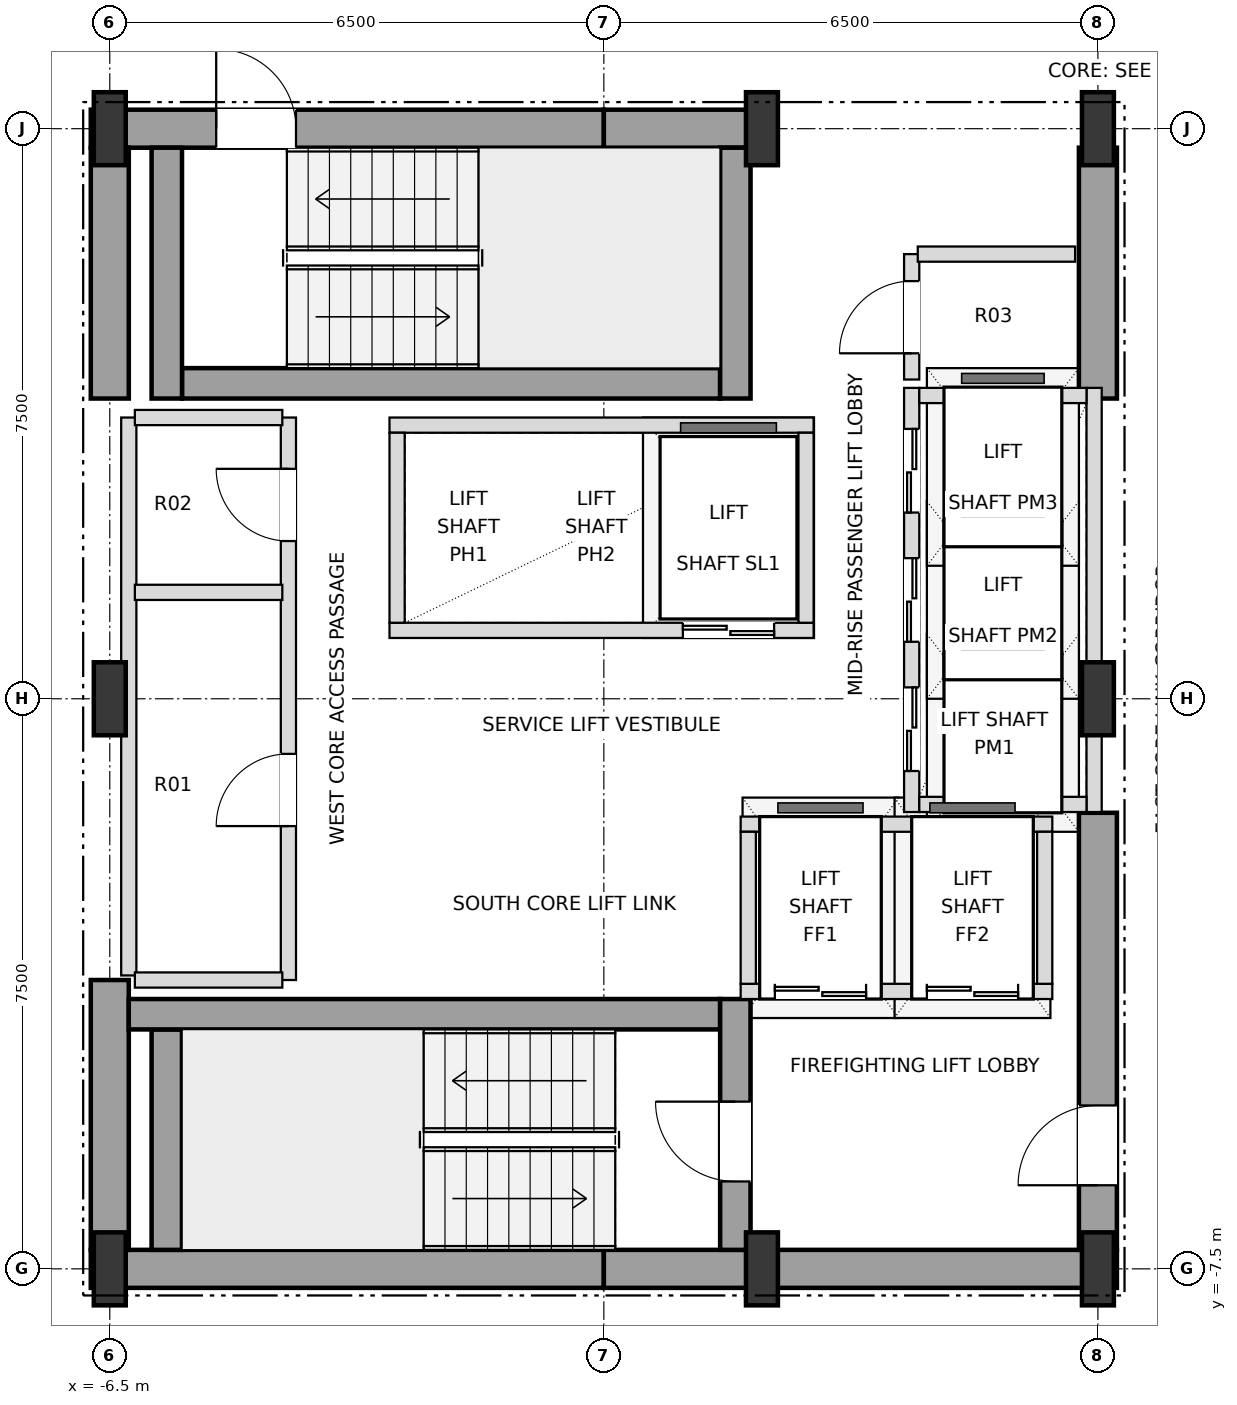
"""IFC4 building model, lengths in metres.
Left out: names, types, materials, properties, quantities, classifications, styles, units other than length and angle.
Written with IfcOpenShell. Run it as: python <this file> out.ifc"""

import sys

from ifc_helpers import new_model, si_unit, direction, frame, frame_2d, origin, origin_2d, place, context, subcontext, project, spatial, rectangle, i_section, extrude, element, fill, save


model = new_model("IFC4")
c1 = context("Model", 3, precision=1e-05, world=origin(), true_north=direction((0.0, 1.0)))
c2 = subcontext(c1, "Body", "Model", "MODEL_VIEW")
j1 = project(units=[si_unit("LENGTHUNIT", "METRE"), si_unit("PLANEANGLEUNIT", "RADIAN")], contexts=[c1])
p1 = place(None, origin())
s1 = spatial("IfcSite", under=j1, at=p1, CompositionType="ELEMENT")
p2 = place(p1, origin())
s2 = spatial("IfcBuilding", under=s1, at=p2, CompositionType="ELEMENT")
p3 = place(p2, frame((0.0, 0.0, 129.6)))
s3 = spatial("IfcBuildingStorey", under=s2, at=p3, CompositionType="ELEMENT", Elevation=129.6)
for number, where, z_axis, x_axis in (
    (1, (-6.5, -7.5, 0.0), (0.0, 0.0, 1.0), (1.0, 0.0, 0.0)),
    (2, (2.08, -7.5, 0.0), (0.0, 0.0, 1.0), (1.0, 0.0, 0.0)),
    (3, (6.5, -7.5, 0.0), (0.0, 0.0, 1.0), (1.0, 0.0, 0.0)),
    (4, (-6.5, 0.0, 0.0), (0.0, 0.0, 1.0), (1.0, 0.0, 0.0)),
    (5, (6.5, 0.0, 0.0), (0.0, 0.0, 1.0), (1.0, 0.0, 0.0)),
    (6, (-6.5, 7.5, 0.0), (0.0, 0.0, 1.0), (1.0, 0.0, 0.0)),
    (7, (2.08, 7.5, 0.0), (0.0, 0.0, 1.0), (1.0, 0.0, 0.0)),
    (8, (6.5, 7.5, 0.0), (0.0, 0.0, 1.0), (1.0, 0.0, 0.0)),
):
    element("IfcColumn", number, at=place(p3, frame(where, z_axis=z_axis, x_axis=x_axis)), inside=s3, PredefinedType="COLUMN", context=c2, shape_type="SweptSolid", body=[
        extrude(i_section(OverallWidth=0.42, OverallDepth=0.96, WebThickness=0.022, FlangeThickness=0.034, at=origin_2d()), origin(), (0.0, 0.0, 1.0), 3.6),
    ])
for number, where, z_axis, x_axis in (
    (9, (-6.75, -7.5, 0.0), (0.0, 0.0, 1.0), (1.0, 0.0, 0.0)),
    (10, (0.0, -7.5, 0.0), (0.0, 0.0, 1.0), (1.0, 0.0, 0.0)),
):
    element("IfcWall", number, at=place(p3, frame(where, z_axis=z_axis, x_axis=x_axis)), inside=s3, PredefinedType="SHEAR", context=c2, shape_type="SweptSolid", body=[
        extrude(rectangle(XDim=6.75, YDim=0.5, at=frame_2d((3.375, 0.0))), origin(), (0.0, 0.0, 1.0), 3.38),
    ])
p4 = place(p3, frame((-6.75, 7.5, 0.0), z_axis=(0.0, 0.0, 1.0), x_axis=(1.0, 0.0, 0.0)))
e11 = element("IfcWall", 11, at=p4, inside=s3, PredefinedType="SHEAR", context=c2, shape_type="SweptSolid", body=[
    extrude(rectangle(XDim=6.75, YDim=0.5, at=frame_2d((3.375, 0.0))), origin(), (0.0, 0.0, 1.0), 3.38),
])
p5 = place(p4, frame((1.65, 0.0, 0.0)))
e12 = element("IfcOpeningElement", 12, at=p5, cuts=e11, PredefinedType="OPENING", context=c2, shape_type="SweptSolid", body=[
    extrude(rectangle(XDim=1.05, YDim=2.15, at=frame_2d((0.525, 1.075))), frame((0.0, 0.26, 0.0), z_axis=(0.0, -1.0, 0.0), x_axis=(1.0, 0.0, 0.0)), (0.0, 0.0, 1.0), 0.52),
])
p6 = place(p3, frame((0.0, 7.5, 0.0), z_axis=(0.0, 0.0, 1.0), x_axis=(1.0, 0.0, 0.0)))
e13 = element("IfcWall", 13, at=p6, inside=s3, PredefinedType="SHEAR", context=c2, shape_type="SweptSolid", body=[
    extrude(rectangle(XDim=2.08, YDim=0.5, at=frame_2d((1.04, 0.0))), origin(), (0.0, 0.0, 1.0), 3.38),
])
p7 = place(p3, frame((-6.5, -7.25, 0.0), z_axis=(0.0, 0.0, 1.0), x_axis=(0.0, 1.0, 0.0)))
e14 = element("IfcWall", 14, at=p7, inside=s3, PredefinedType="SHEAR", context=c2, shape_type="SweptSolid", body=[
    extrude(rectangle(XDim=3.55, YDim=0.5, at=frame_2d((1.775, 0.0))), origin(), (0.0, 0.0, 1.0), 3.38),
])
p8 = place(p3, frame((-6.5, 3.95, 0.0), z_axis=(0.0, 0.0, 1.0), x_axis=(0.0, 1.0, 0.0)))
e15 = element("IfcWall", 15, at=p8, inside=s3, PredefinedType="SHEAR", context=c2, shape_type="SweptSolid", body=[
    extrude(rectangle(XDim=3.3, YDim=0.5, at=frame_2d((1.65, 0.0))), origin(), (0.0, 0.0, 1.0), 3.38),
])
p9 = place(p3, frame((6.5, -7.25, 0.0), z_axis=(0.0, 0.0, 1.0), x_axis=(0.0, 1.0, 0.0)))
e16 = element("IfcWall", 16, at=p9, inside=s3, PredefinedType="SHEAR", context=c2, shape_type="SweptSolid", body=[
    extrude(rectangle(XDim=5.75, YDim=0.5, at=frame_2d((2.875, 0.0))), origin(), (0.0, 0.0, 1.0), 3.38),
])
p10 = place(p9, frame((0.85, 0.0, 0.0)))
e17 = element("IfcOpeningElement", 17, at=p10, cuts=e16, PredefinedType="OPENING", context=c2, shape_type="SweptSolid", body=[
    extrude(rectangle(XDim=1.05, YDim=2.15, at=frame_2d((0.525, 1.075))), frame((0.0, 0.26, 0.0), z_axis=(0.0, -1.0, 0.0), x_axis=(1.0, 0.0, 0.0)), (0.0, 0.0, 1.0), 0.52),
])
p11 = place(p3, frame((6.5, 3.95, 0.0), z_axis=(0.0, 0.0, 1.0), x_axis=(0.0, 1.0, 0.0)))
e18 = element("IfcWall", 18, at=p11, inside=s3, PredefinedType="SHEAR", context=c2, shape_type="SweptSolid", body=[
    extrude(rectangle(XDim=3.3, YDim=0.5, at=frame_2d((1.65, 0.0))), origin(), (0.0, 0.0, 1.0), 3.38),
])
p12 = place(p3, frame((-5.75, -7.25, 0.0), z_axis=(0.0, 0.0, 1.0), x_axis=(0.0, 1.0, 0.0)))
e19 = element("IfcWall", 19, at=p12, inside=s3, PredefinedType="SHEAR", context=c2, shape_type="SweptSolid", body=[
    extrude(rectangle(XDim=2.9, YDim=0.4, at=frame_2d((1.45, 0.0))), origin(), (0.0, 0.0, 1.0), 3.38),
])
p13 = place(p3, frame((-6.25, -4.15, 0.0), z_axis=(0.0, 0.0, 1.0), x_axis=(1.0, 0.0, 0.0)))
e20 = element("IfcWall", 20, at=p13, inside=s3, PredefinedType="SHEAR", context=c2, shape_type="SweptSolid", body=[
    extrude(rectangle(XDim=7.78, YDim=0.4, at=frame_2d((3.89, 0.0))), origin(), (0.0, 0.0, 1.0), 3.38),
])
p14 = place(p3, frame((1.73, -7.25, 0.0), z_axis=(0.0, 0.0, 1.0), x_axis=(0.0, 1.0, 0.0)))
e21 = element("IfcWall", 21, at=p14, inside=s3, PredefinedType="SHEAR", context=c2, shape_type="SweptSolid", body=[
    extrude(rectangle(XDim=3.3, YDim=0.4, at=frame_2d((1.65, 0.0))), origin(), (0.0, 0.0, 1.0), 3.38),
])
p15 = place(p14, frame((0.9, 0.0, 0.0)))
e22 = element("IfcOpeningElement", 22, at=p15, cuts=e21, PredefinedType="OPENING", context=c2, shape_type="SweptSolid", body=[
    extrude(rectangle(XDim=1.05, YDim=2.15, at=frame_2d((0.525, 1.075))), frame((0.0, 0.21, 0.0), z_axis=(0.0, -1.0, 0.0), x_axis=(1.0, 0.0, 0.0)), (0.0, 0.0, 1.0), 0.42),
])
p16 = place(p3, frame((-5.55, 4.15, 0.0), z_axis=(0.0, 0.0, 1.0), x_axis=(1.0, 0.0, 0.0)))
e23 = element("IfcWall", 23, at=p16, inside=s3, PredefinedType="SHEAR", context=c2, shape_type="SweptSolid", body=[
    extrude(rectangle(XDim=7.08, YDim=0.4, at=frame_2d((3.54, 0.0))), origin(), (0.0, 0.0, 1.0), 3.38),
])
for number, where, z_axis, x_axis in (
    (24, (1.73, 3.95, 0.0), (0.0, 0.0, 1.0), (0.0, 1.0, 0.0)),
    (25, (-5.75, 3.95, 0.0), (0.0, 0.0, 1.0), (0.0, 1.0, 0.0)),
):
    element("IfcWall", number, at=place(p3, frame(where, z_axis=z_axis, x_axis=x_axis)), inside=s3, PredefinedType="SHEAR", context=c2, shape_type="SweptSolid", body=[
        extrude(rectangle(XDim=3.3, YDim=0.4, at=frame_2d((1.65, 0.0))), origin(), (0.0, 0.0, 1.0), 3.38),
    ])
p17 = place(p3, frame((4.05, -1.49, 0.0), z_axis=(0.0, 0.0, 1.0), x_axis=(0.0, 1.0, 0.0)))
e26 = element("IfcWall", 26, at=p17, inside=s3, PredefinedType="SOLIDWALL", context=c2, shape_type="SweptSolid", body=[
    extrude(rectangle(XDim=5.58, YDim=0.2, at=frame_2d((2.79, 0.0))), origin(), (0.0, 0.0, 1.0), 3.38),
])
p18 = place(p17, frame((0.54, 0.0, 0.0)))
e27 = element("IfcOpeningElement", 27, at=p18, cuts=e26, PredefinedType="OPENING", context=c2, shape_type="SweptSolid", body=[
    extrude(rectangle(XDim=1.1, YDim=2.15, at=frame_2d((0.55, 1.075))), frame((0.0, 0.11, 0.0), z_axis=(0.0, -1.0, 0.0), x_axis=(1.0, 0.0, 0.0)), (0.0, 0.0, 1.0), 0.22),
])
p19 = place(p17, frame((2.24, 0.0, 0.0)))
e28 = element("IfcOpeningElement", 28, at=p19, cuts=e26, PredefinedType="OPENING", context=c2, shape_type="SweptSolid", body=[
    extrude(rectangle(XDim=1.1, YDim=2.15, at=frame_2d((0.55, 1.075))), frame((0.0, 0.11, 0.0), z_axis=(0.0, -1.0, 0.0), x_axis=(1.0, 0.0, 0.0)), (0.0, 0.0, 1.0), 0.22),
])
p20 = place(p17, frame((3.94, 0.0, 0.0)))
e29 = element("IfcOpeningElement", 29, at=p20, cuts=e26, PredefinedType="OPENING", context=c2, shape_type="SweptSolid", body=[
    extrude(rectangle(XDim=1.1, YDim=2.15, at=frame_2d((0.55, 1.075))), frame((0.0, 0.11, 0.0), z_axis=(0.0, -1.0, 0.0), x_axis=(1.0, 0.0, 0.0)), (0.0, 0.0, 1.0), 0.22),
])
p21 = place(p3, frame((6.45, -1.49, 0.0), z_axis=(0.0, 0.0, 1.0), x_axis=(0.0, 1.0, 0.0)))
e30 = element("IfcWall", 30, at=p21, inside=s3, PredefinedType="SOLIDWALL", context=c2, shape_type="SweptSolid", body=[
    extrude(rectangle(XDim=5.58, YDim=0.2, at=frame_2d((2.79, 0.0))), origin(), (0.0, 0.0, 1.0), 2.816),
])
for number, where, z_axis, x_axis in (
    (31, (4.15, -1.39, 0.0), (0.0, 0.0, 1.0), (1.0, 0.0, 0.0)),
    (32, (4.15, 3.99, 0.0), (0.0, 0.0, 1.0), (1.0, 0.0, 0.0)),
):
    element("IfcWall", number, at=place(p3, frame(where, z_axis=z_axis, x_axis=x_axis)), inside=s3, PredefinedType="SOLIDWALL", context=c2, shape_type="SweptSolid", body=[
        extrude(rectangle(XDim=2.2, YDim=0.2, at=frame_2d((1.1, 0.0))), origin(), (0.0, 0.0, 1.0), 3.38),
    ])
p22 = place(p3, frame((-2.82, 0.9, 0.0), z_axis=(0.0, 0.0, 1.0), x_axis=(1.0, 0.0, 0.0)))
e33 = element("IfcWall", 33, at=p22, inside=s3, PredefinedType="SOLIDWALL", context=c2, shape_type="SweptSolid", body=[
    extrude(rectangle(XDim=5.58, YDim=0.2, at=frame_2d((2.79, 0.0))), origin(), (0.0, 0.0, 1.0), 3.38),
])
p23 = place(p22, frame((3.86, 0.0, 0.0)))
e34 = element("IfcOpeningElement", 34, at=p23, cuts=e33, PredefinedType="OPENING", context=c2, shape_type="SweptSolid", body=[
    extrude(rectangle(XDim=1.2, YDim=2.2, at=frame_2d((0.6, 1.1))), frame((0.0, 0.11, 0.0), z_axis=(0.0, -1.0, 0.0), x_axis=(1.0, 0.0, 0.0)), (0.0, 0.0, 1.0), 0.22),
])
p24 = place(p3, frame((-2.82, 3.6, 0.0), z_axis=(0.0, 0.0, 1.0), x_axis=(1.0, 0.0, 0.0)))
e35 = element("IfcWall", 35, at=p24, inside=s3, PredefinedType="SOLIDWALL", context=c2, shape_type="SweptSolid", body=[
    extrude(rectangle(XDim=5.58, YDim=0.2, at=frame_2d((2.79, 0.0))), origin(), (0.0, 0.0, 1.0), 3.38),
])
for number, where, z_axis, x_axis in (
    (36, (-2.72, 1.0, 0.0), (0.0, 0.0, 1.0), (0.0, 1.0, 0.0)),
    (37, (2.66, 1.0, 0.0), (0.0, 0.0, 1.0), (0.0, 1.0, 0.0)),
):
    element("IfcWall", number, at=place(p3, frame(where, z_axis=z_axis, x_axis=x_axis)), inside=s3, PredefinedType="SOLIDWALL", context=c2, shape_type="SweptSolid", body=[
        extrude(rectangle(XDim=2.5, YDim=0.2, at=frame_2d((1.25, 0.0))), origin(), (0.0, 0.0, 1.0), 3.38),
    ])
p25 = place(p3, frame((1.8, -3.85, 0.0), z_axis=(0.0, 0.0, 1.0), x_axis=(1.0, 0.0, 0.0)))
e38 = element("IfcWall", 38, at=p25, inside=s3, PredefinedType="SOLIDWALL", context=c2, shape_type="SweptSolid", body=[
    extrude(rectangle(XDim=4.1, YDim=0.2, at=frame_2d((2.05, 0.0))), origin(), (0.0, 0.0, 1.0), 3.38),
])
p26 = place(p25, frame((0.45, 0.0, 0.0)))
e39 = element("IfcOpeningElement", 39, at=p26, cuts=e38, PredefinedType="OPENING", context=c2, shape_type="SweptSolid", body=[
    extrude(rectangle(XDim=1.2, YDim=2.2, at=frame_2d((0.6, 1.1))), frame((0.0, 0.11, 0.0), z_axis=(0.0, -1.0, 0.0), x_axis=(1.0, 0.0, 0.0)), (0.0, 0.0, 1.0), 0.22),
])
p27 = place(p25, frame((2.45, 0.0, 0.0)))
e40 = element("IfcOpeningElement", 40, at=p27, cuts=e38, PredefinedType="OPENING", context=c2, shape_type="SweptSolid", body=[
    extrude(rectangle(XDim=1.2, YDim=2.2, at=frame_2d((0.6, 1.1))), frame((0.0, 0.11, 0.0), z_axis=(0.0, -1.0, 0.0), x_axis=(1.0, 0.0, 0.0)), (0.0, 0.0, 1.0), 0.22),
])
p28 = place(p3, frame((1.8, -1.65, 0.0), z_axis=(0.0, 0.0, 1.0), x_axis=(1.0, 0.0, 0.0)))
e41 = element("IfcWall", 41, at=p28, inside=s3, PredefinedType="SOLIDWALL", context=c2, shape_type="SweptSolid", body=[
    extrude(rectangle(XDim=4.1, YDim=0.2, at=frame_2d((2.05, 0.0))), origin(), (0.0, 0.0, 1.0), 3.38),
])
for number, where, z_axis, x_axis in (
    (42, (1.9, -3.75, 0.0), (0.0, 0.0, 1.0), (0.0, 1.0, 0.0)),
    (43, (5.8, -3.75, 0.0), (0.0, 0.0, 1.0), (0.0, 1.0, 0.0)),
):
    element("IfcWall", number, at=place(p3, frame(where, z_axis=z_axis, x_axis=x_axis)), inside=s3, PredefinedType="SOLIDWALL", context=c2, shape_type="SweptSolid", body=[
        extrude(rectangle(XDim=2.0, YDim=0.2, at=frame_2d((1.0, 0.0))), origin(), (0.0, 0.0, 1.0), 3.38),
    ])
p29 = place(p3, frame((-6.25, -3.64, 0.0), z_axis=(0.0, 0.0, 1.0), x_axis=(0.0, 1.0, 0.0)))
e44 = element("IfcWall", 44, at=p29, inside=s3, PredefinedType="SOLIDWALL", context=c2, shape_type="SweptSolid", body=[
    extrude(rectangle(XDim=7.34, YDim=0.2, at=frame_2d((3.67, 0.0))), origin(), (0.0, 0.0, 1.0), 3.38),
])
p30 = place(p3, frame((-4.15, -3.7, 0.0), z_axis=(0.0, 0.0, 1.0), x_axis=(0.0, 1.0, 0.0)))
e45 = element("IfcWall", 45, at=p30, inside=s3, PredefinedType="SOLIDWALL", context=c2, shape_type="SweptSolid", body=[
    extrude(rectangle(XDim=7.4, YDim=0.2, at=frame_2d((3.7, 0.0))), origin(), (0.0, 0.0, 1.0), 3.38),
])
p31 = place(p30, frame((2.025, 0.0, 0.0)))
e46 = element("IfcOpeningElement", 46, at=p31, cuts=e45, PredefinedType="OPENING", context=c2, shape_type="SweptSolid", body=[
    extrude(rectangle(XDim=0.95, YDim=2.15, at=frame_2d((0.475, 1.075))), frame((0.0, 0.11, 0.0), z_axis=(0.0, -1.0, 0.0), x_axis=(1.0, 0.0, 0.0)), (0.0, 0.0, 1.0), 0.22),
])
p32 = place(p30, frame((5.775, 0.0, 0.0)))
e47 = element("IfcOpeningElement", 47, at=p32, cuts=e45, PredefinedType="OPENING", context=c2, shape_type="SweptSolid", body=[
    extrude(rectangle(XDim=0.95, YDim=2.15, at=frame_2d((0.475, 1.075))), frame((0.0, 0.11, 0.0), z_axis=(0.0, -1.0, 0.0), x_axis=(1.0, 0.0, 0.0)), (0.0, 0.0, 1.0), 0.22),
])
p33 = place(p3, frame((4.05, 4.2, 0.0), z_axis=(0.0, 0.0, 1.0), x_axis=(0.0, 1.0, 0.0)))
e48 = element("IfcWall", 48, at=p33, inside=s3, PredefinedType="SOLIDWALL", context=c2, shape_type="SweptSolid", body=[
    extrude(rectangle(XDim=1.65, YDim=0.2, at=frame_2d((0.825, 0.0))), origin(), (0.0, 0.0, 1.0), 3.38),
])
p34 = place(p33, frame((0.345, 0.0, 0.0)))
e49 = element("IfcOpeningElement", 49, at=p34, cuts=e48, PredefinedType="OPENING", context=c2, shape_type="SweptSolid", body=[
    extrude(rectangle(XDim=0.95, YDim=2.15, at=frame_2d((0.475, 1.075))), frame((0.0, 0.11, 0.0), z_axis=(0.0, -1.0, 0.0), x_axis=(1.0, 0.0, 0.0)), (0.0, 0.0, 1.0), 0.22),
])
for number, where, z_axis, x_axis in (
    (50, (-6.17, -3.7, 0.0), (0.0, 0.0, 1.0), (1.0, 0.0, 0.0)),
    (51, (-6.17, 1.4, 0.0), (0.0, 0.0, 1.0), (1.0, 0.0, 0.0)),
    (52, (-6.17, 3.7, 0.0), (0.0, 0.0, 1.0), (1.0, 0.0, 0.0)),
):
    element("IfcWall", number, at=place(p3, frame(where, z_axis=z_axis, x_axis=x_axis)), inside=s3, PredefinedType="SOLIDWALL", context=c2, shape_type="SweptSolid", body=[
        extrude(rectangle(XDim=1.94, YDim=0.2, at=frame_2d((0.97, 0.0))), origin(), (0.0, 0.0, 1.0), 3.38),
    ])
p35 = place(p3, frame((4.13, 5.85, 0.0), z_axis=(0.0, 0.0, 1.0), x_axis=(1.0, 0.0, 0.0)))
e53 = element("IfcWall", 53, at=p35, inside=s3, PredefinedType="SOLIDWALL", context=c2, shape_type="SweptSolid", body=[
    extrude(rectangle(XDim=2.07, YDim=0.2, at=frame_2d((1.035, 0.0))), origin(), (0.0, 0.0, 1.0), 3.38),
])
p36 = place(p10, origin())
e54 = element("IfcDoor", 54, at=p36, inside=s3, OperationType="SINGLE_SWING_LEFT", PredefinedType="DOOR", context=c2, shape_type="SweptSolid", body=[
    extrude(rectangle(XDim=1.05, YDim=2.15, at=frame_2d((0.525, 1.075))), frame((0.0, 0.025, 0.0), z_axis=(0.0, -1.0, 0.0), x_axis=(1.0, 0.0, 0.0)), (0.0, 0.0, 1.0), 0.05),
])
fill(e17, e54)
p37 = place(p15, origin())
e55 = element("IfcDoor", 55, at=p37, inside=s3, OperationType="SINGLE_SWING_RIGHT", PredefinedType="DOOR", context=c2, shape_type="SweptSolid", body=[
    extrude(rectangle(XDim=1.05, YDim=2.15, at=frame_2d((0.525, 1.075))), frame((0.0, 0.025, 0.0), z_axis=(0.0, -1.0, 0.0), x_axis=(1.0, 0.0, 0.0)), (0.0, 0.0, 1.0), 0.05),
])
fill(e22, e55)
p38 = place(p5, origin())
e56 = element("IfcDoor", 56, at=p38, inside=s3, OperationType="SINGLE_SWING_LEFT", PredefinedType="DOOR", context=c2, shape_type="SweptSolid", body=[
    extrude(rectangle(XDim=1.05, YDim=2.15, at=frame_2d((0.525, 1.075))), frame((0.0, 0.025, 0.0), z_axis=(0.0, -1.0, 0.0), x_axis=(1.0, 0.0, 0.0)), (0.0, 0.0, 1.0), 0.05),
])
fill(e12, e56)
p39 = place(p18, origin())
e57 = element("IfcDoor", 57, at=p39, inside=s3, OperationType="DOUBLE_DOOR_SLIDING", PredefinedType="DOOR", context=c2, shape_type="SweptSolid", body=[
    extrude(rectangle(XDim=1.1, YDim=2.15, at=frame_2d((0.55, 1.075))), frame((0.0, 0.025, 0.0), z_axis=(0.0, -1.0, 0.0), x_axis=(1.0, 0.0, 0.0)), (0.0, 0.0, 1.0), 0.05),
])
fill(e27, e57)
p40 = place(p19, origin())
e58 = element("IfcDoor", 58, at=p40, inside=s3, OperationType="DOUBLE_DOOR_SLIDING", PredefinedType="DOOR", context=c2, shape_type="SweptSolid", body=[
    extrude(rectangle(XDim=1.1, YDim=2.15, at=frame_2d((0.55, 1.075))), frame((0.0, 0.025, 0.0), z_axis=(0.0, -1.0, 0.0), x_axis=(1.0, 0.0, 0.0)), (0.0, 0.0, 1.0), 0.05),
])
fill(e28, e58)
p41 = place(p20, origin())
e59 = element("IfcDoor", 59, at=p41, inside=s3, OperationType="DOUBLE_DOOR_SLIDING", PredefinedType="DOOR", context=c2, shape_type="SweptSolid", body=[
    extrude(rectangle(XDim=1.1, YDim=2.15, at=frame_2d((0.55, 1.075))), frame((0.0, 0.025, 0.0), z_axis=(0.0, -1.0, 0.0), x_axis=(1.0, 0.0, 0.0)), (0.0, 0.0, 1.0), 0.05),
])
fill(e29, e59)
p42 = place(p23, origin())
e60 = element("IfcDoor", 60, at=p42, inside=s3, OperationType="DOUBLE_DOOR_SLIDING", PredefinedType="DOOR", context=c2, shape_type="SweptSolid", body=[
    extrude(rectangle(XDim=1.2, YDim=2.2, at=frame_2d((0.6, 1.1))), frame((0.0, 0.025, 0.0), z_axis=(0.0, -1.0, 0.0), x_axis=(1.0, 0.0, 0.0)), (0.0, 0.0, 1.0), 0.05),
])
fill(e34, e60)
p43 = place(p26, origin())
e61 = element("IfcDoor", 61, at=p43, inside=s3, OperationType="DOUBLE_DOOR_SLIDING", PredefinedType="DOOR", context=c2, shape_type="SweptSolid", body=[
    extrude(rectangle(XDim=1.2, YDim=2.2, at=frame_2d((0.6, 1.1))), frame((0.0, 0.025, 0.0), z_axis=(0.0, -1.0, 0.0), x_axis=(1.0, 0.0, 0.0)), (0.0, 0.0, 1.0), 0.05),
])
fill(e39, e61)
p44 = place(p27, origin())
e62 = element("IfcDoor", 62, at=p44, inside=s3, OperationType="DOUBLE_DOOR_SLIDING", PredefinedType="DOOR", context=c2, shape_type="SweptSolid", body=[
    extrude(rectangle(XDim=1.2, YDim=2.2, at=frame_2d((0.6, 1.1))), frame((0.0, 0.025, 0.0), z_axis=(0.0, -1.0, 0.0), x_axis=(1.0, 0.0, 0.0)), (0.0, 0.0, 1.0), 0.05),
])
fill(e40, e62)
p45 = place(p31, origin())
e63 = element("IfcDoor", 63, at=p45, inside=s3, OperationType="SINGLE_SWING_LEFT", PredefinedType="DOOR", context=c2, shape_type="SweptSolid", body=[
    extrude(rectangle(XDim=0.95, YDim=2.15, at=frame_2d((0.475, 1.075))), frame((0.0, 0.025, 0.0), z_axis=(0.0, -1.0, 0.0), x_axis=(1.0, 0.0, 0.0)), (0.0, 0.0, 1.0), 0.05),
])
fill(e46, e63)
p46 = place(p32, origin())
e64 = element("IfcDoor", 64, at=p46, inside=s3, OperationType="SINGLE_SWING_RIGHT", PredefinedType="DOOR", context=c2, shape_type="SweptSolid", body=[
    extrude(rectangle(XDim=0.95, YDim=2.15, at=frame_2d((0.475, 1.075))), frame((0.0, 0.025, 0.0), z_axis=(0.0, -1.0, 0.0), x_axis=(1.0, 0.0, 0.0)), (0.0, 0.0, 1.0), 0.05),
])
fill(e47, e64)
p47 = place(p34, origin())
e65 = element("IfcDoor", 65, at=p47, inside=s3, OperationType="SINGLE_SWING_LEFT", PredefinedType="DOOR", context=c2, shape_type="SweptSolid", body=[
    extrude(rectangle(XDim=0.95, YDim=2.15, at=frame_2d((0.475, 1.075))), frame((0.0, 0.025, 0.0), z_axis=(0.0, -1.0, 0.0), x_axis=(1.0, 0.0, 0.0)), (0.0, 0.0, 1.0), 0.05),
])
fill(e49, e65)
save(model, sys.argv[1])
